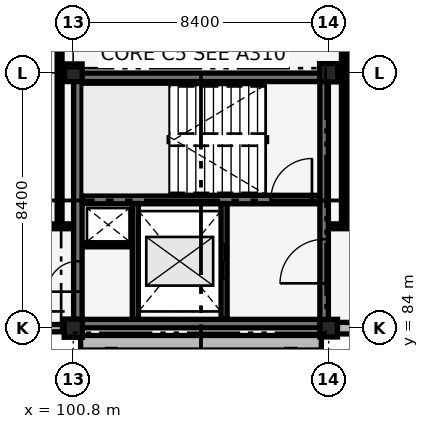
"""IFC4 building model, lengths in metres.
Left out: names, types, materials, properties, quantities, classifications, styles, units other than length and angle.
Written with IfcOpenShell. Run it as: python <this file> out.ifc"""

import sys

from ifc_helpers import new_model, si_unit, direction, frame, frame_2d, origin, origin_2d, place, context, subcontext, project, spatial, rectangle, extrude, element, fill, save


model = new_model("IFC4")
c1 = context("Model", 3, precision=1e-05, world=origin(), true_north=direction((0.0, 1.0)))
c2 = subcontext(c1, "Body", "Model", "MODEL_VIEW")
j1 = project(units=[si_unit("LENGTHUNIT", "METRE"), si_unit("PLANEANGLEUNIT", "RADIAN")], contexts=[c1])
p1 = place(None, origin())
s1 = spatial("IfcSite", under=j1, at=p1, CompositionType="ELEMENT")
p2 = place(p1, origin())
s2 = spatial("IfcBuilding", under=s1, at=p2, CompositionType="ELEMENT")
p3 = place(p2, frame((0.0, 0.0, 9.86)))
s3 = spatial("IfcBuildingStorey", under=s2, at=p3, CompositionType="ELEMENT", Elevation=9.86)
for number, where, z_axis, x_axis in (
    (1, (100.95, 84.15, 0.0), (0.0, 0.0, 1.0), (1.0, 0.0, 0.0)),
    (2, (100.95, 92.25, 0.0), (0.0, 0.0, 1.0), (1.0, 0.0, 0.0)),
):
    element("IfcWall", number, at=place(p3, frame(where, z_axis=z_axis, x_axis=x_axis)), inside=s3, PredefinedType="SHEAR", context=c2, shape_type="SweptSolid", body=[
        extrude(rectangle(XDim=8.1, YDim=0.28, at=frame_2d((4.05, 0.0))), origin(), (0.0, 0.0, 1.0), 3.78),
    ])
p4 = place(p3, frame((100.95, 84.15, 0.0), z_axis=(0.0, 0.0, 1.0), x_axis=(0.0, 1.0, 0.0)))
e3 = element("IfcWall", 3, at=p4, inside=s3, PredefinedType="SHEAR", context=c2, shape_type="SweptSolid", body=[
    extrude(rectangle(XDim=8.1, YDim=0.28, at=frame_2d((4.05, 0.0))), origin(), (0.0, 0.0, 1.0), 3.78),
])
p5 = place(p4, frame((1.05, 0.0, 0.0)))
e4 = element("IfcOpeningElement", 4, at=p5, cuts=e3, PredefinedType="OPENING", context=c2, shape_type="SweptSolid", body=[
    extrude(rectangle(XDim=1.0, YDim=2.15, at=frame_2d((0.5, 1.075))), frame((0.0, 0.15, 0.0), z_axis=(0.0, -1.0, 0.0), x_axis=(1.0, 0.0, 0.0)), (0.0, 0.0, 1.0), 0.3),
])
p6 = place(p3, frame((109.05, 84.15, 0.0), z_axis=(0.0, 0.0, 1.0), x_axis=(0.0, 1.0, 0.0)))
e5 = element("IfcWall", 5, at=p6, inside=s3, PredefinedType="SHEAR", context=c2, shape_type="SweptSolid", body=[
    extrude(rectangle(XDim=8.1, YDim=0.28, at=frame_2d((4.05, 0.0))), origin(), (0.0, 0.0, 1.0), 3.78),
])
p7 = place(p6, frame((1.325, 0.0, 0.0)))
e6 = element("IfcOpeningElement", 6, at=p7, cuts=e5, PredefinedType="OPENING", context=c2, shape_type="SweptSolid", body=[
    extrude(rectangle(XDim=1.45, YDim=2.15, at=frame_2d((0.725, 1.075))), frame((0.0, 0.15, 0.0), z_axis=(0.0, -1.0, 0.0), x_axis=(1.0, 0.0, 0.0)), (0.0, 0.0, 1.0), 0.3),
])
p8 = place(p3, frame((101.1, 88.23, 0.0), z_axis=(0.0, 0.0, 1.0), x_axis=(1.0, 0.0, 0.0)))
e7 = element("IfcWall", 7, at=p8, inside=s3, PredefinedType="SHEAR", context=c2, shape_type="SweptSolid", body=[
    extrude(rectangle(XDim=7.8, YDim=0.28, at=frame_2d((3.9, 0.0))), origin(), (0.0, 0.0, 1.0), 3.78),
])
p9 = place(p8, frame((6.2, 0.0, 0.0)))
e8 = element("IfcOpeningElement", 8, at=p9, cuts=e7, PredefinedType="OPENING", context=c2, shape_type="SweptSolid", body=[
    extrude(rectangle(XDim=1.35, YDim=2.15, at=frame_2d((0.675, 1.075))), frame((0.0, 0.15, 0.0), z_axis=(0.0, -1.0, 0.0), x_axis=(1.0, 0.0, 0.0)), (0.0, 0.0, 1.0), 0.3),
])
p10 = place(p3, frame((100.8, 84.0, 0.0), z_axis=(0.0, 0.0, 1.0), x_axis=(1.0, 0.0, 0.0)))
e9 = element("IfcColumn", 9, at=p10, inside=s3, PredefinedType="COLUMN", context=c2, shape_type="SweptSolid", body=[
    extrude(rectangle(XDim=0.6, YDim=0.6, at=origin_2d()), origin(), (0.0, 0.0, 1.0), 3.78),
])
for number, where, z_axis, x_axis in (
    (10, (100.8, 92.4, 0.0), (0.0, 0.0, 1.0), (1.0, 0.0, 0.0)),
    (11, (109.2, 84.0, 0.0), (0.0, 0.0, 1.0), (1.0, 0.0, 0.0)),
):
    element("IfcColumn", number, at=place(p3, frame(where, z_axis=z_axis, x_axis=x_axis)), inside=s3, PredefinedType="COLUMN", context=c2, shape_type="SweptSolid", body=[
        extrude(rectangle(XDim=0.58, YDim=0.58, at=origin_2d()), origin(), (0.0, 0.0, 1.0), 3.78),
    ])
p11 = place(p3, frame((109.2, 92.4, 0.0), z_axis=(0.0, 0.0, 1.0), x_axis=(1.0, 0.0, 0.0)))
e12 = element("IfcColumn", 12, at=p11, inside=s3, PredefinedType="COLUMN", context=c2, shape_type="SweptSolid", body=[
    extrude(rectangle(XDim=0.6, YDim=0.6, at=origin_2d()), origin(), (0.0, 0.0, 1.0), 3.78),
])
p12 = place(p3, frame((92.595, 84.0, 0.0), z_axis=(0.0, 0.0, 1.0), x_axis=(1.0, 0.0, 0.0)))
e13 = element("IfcWall", 13, at=p12, inside=s3, PredefinedType="SOLIDWALL", context=c2, shape_type="SweptSolid", body=[
    extrude(rectangle(XDim=7.92, YDim=0.24, at=frame_2d((3.96, 0.0))), origin(), (0.0, 0.0, 1.0), 3.78),
])
p13 = place(p12, frame((0.812, 0.0, 0.35)))
e14 = element("IfcOpeningElement", 14, at=p13, cuts=e13, PredefinedType="OPENING", context=c2, shape_type="SweptSolid", body=[
    extrude(rectangle(XDim=0.44, YDim=1.25, at=frame_2d((0.22, 0.625))), frame((0.0, 0.13, 0.0), z_axis=(0.0, -1.0, 0.0), x_axis=(1.0, 0.0, 0.0)), (0.0, 0.0, 1.0), 0.26),
])
p14 = place(p12, frame((2.276, 0.0, 0.35)))
e15 = element("IfcOpeningElement", 15, at=p14, cuts=e13, PredefinedType="OPENING", context=c2, shape_type="SweptSolid", body=[
    extrude(rectangle(XDim=0.44, YDim=1.25, at=frame_2d((0.22, 0.625))), frame((0.0, 0.13, 0.0), z_axis=(0.0, -1.0, 0.0), x_axis=(1.0, 0.0, 0.0)), (0.0, 0.0, 1.0), 0.26),
])
p15 = place(p12, frame((3.74, 0.0, 0.35)))
e16 = element("IfcOpeningElement", 16, at=p15, cuts=e13, PredefinedType="OPENING", context=c2, shape_type="SweptSolid", body=[
    extrude(rectangle(XDim=0.44, YDim=1.25, at=frame_2d((0.22, 0.625))), frame((0.0, 0.13, 0.0), z_axis=(0.0, -1.0, 0.0), x_axis=(1.0, 0.0, 0.0)), (0.0, 0.0, 1.0), 0.26),
])
p16 = place(p12, frame((5.204, 0.0, 0.35)))
e17 = element("IfcOpeningElement", 17, at=p16, cuts=e13, PredefinedType="OPENING", context=c2, shape_type="SweptSolid", body=[
    extrude(rectangle(XDim=0.44, YDim=1.25, at=frame_2d((0.22, 0.625))), frame((0.0, 0.13, 0.0), z_axis=(0.0, -1.0, 0.0), x_axis=(1.0, 0.0, 0.0)), (0.0, 0.0, 1.0), 0.26),
])
p17 = place(p12, frame((6.668, 0.0, 0.35)))
e18 = element("IfcOpeningElement", 18, at=p17, cuts=e13, PredefinedType="OPENING", context=c2, shape_type="SweptSolid", body=[
    extrude(rectangle(XDim=0.44, YDim=1.25, at=frame_2d((0.22, 0.625))), frame((0.0, 0.13, 0.0), z_axis=(0.0, -1.0, 0.0), x_axis=(1.0, 0.0, 0.0)), (0.0, 0.0, 1.0), 0.26),
])
p18 = place(p12, frame((0.812, 0.0, 1.8)))
e19 = element("IfcOpeningElement", 19, at=p18, cuts=e13, PredefinedType="OPENING", context=c2, shape_type="SweptSolid", body=[
    extrude(rectangle(XDim=0.44, YDim=1.25, at=frame_2d((0.22, 0.625))), frame((0.0, 0.13, 0.0), z_axis=(0.0, -1.0, 0.0), x_axis=(1.0, 0.0, 0.0)), (0.0, 0.0, 1.0), 0.26),
])
p19 = place(p12, frame((2.276, 0.0, 1.8)))
e20 = element("IfcOpeningElement", 20, at=p19, cuts=e13, PredefinedType="OPENING", context=c2, shape_type="SweptSolid", body=[
    extrude(rectangle(XDim=0.44, YDim=1.25, at=frame_2d((0.22, 0.625))), frame((0.0, 0.13, 0.0), z_axis=(0.0, -1.0, 0.0), x_axis=(1.0, 0.0, 0.0)), (0.0, 0.0, 1.0), 0.26),
])
p20 = place(p12, frame((3.74, 0.0, 1.8)))
e21 = element("IfcOpeningElement", 21, at=p20, cuts=e13, PredefinedType="OPENING", context=c2, shape_type="SweptSolid", body=[
    extrude(rectangle(XDim=0.44, YDim=1.25, at=frame_2d((0.22, 0.625))), frame((0.0, 0.13, 0.0), z_axis=(0.0, -1.0, 0.0), x_axis=(1.0, 0.0, 0.0)), (0.0, 0.0, 1.0), 0.26),
])
p21 = place(p12, frame((5.204, 0.0, 1.8)))
e22 = element("IfcOpeningElement", 22, at=p21, cuts=e13, PredefinedType="OPENING", context=c2, shape_type="SweptSolid", body=[
    extrude(rectangle(XDim=0.44, YDim=1.25, at=frame_2d((0.22, 0.625))), frame((0.0, 0.13, 0.0), z_axis=(0.0, -1.0, 0.0), x_axis=(1.0, 0.0, 0.0)), (0.0, 0.0, 1.0), 0.26),
])
p22 = place(p12, frame((6.668, 0.0, 1.8)))
e23 = element("IfcOpeningElement", 23, at=p22, cuts=e13, PredefinedType="OPENING", context=c2, shape_type="SweptSolid", body=[
    extrude(rectangle(XDim=0.44, YDim=1.25, at=frame_2d((0.22, 0.625))), frame((0.0, 0.13, 0.0), z_axis=(0.0, -1.0, 0.0), x_axis=(1.0, 0.0, 0.0)), (0.0, 0.0, 1.0), 0.26),
])
p23 = place(p3, frame((101.04, 83.52, 0.0), z_axis=(0.0, 0.0, 1.0), x_axis=(1.0, 0.0, 0.0)))
e24 = element("IfcWall", 24, at=p23, inside=s3, PredefinedType="SOLIDWALL", context=c2, shape_type="SweptSolid", body=[
    extrude(rectangle(XDim=7.92, YDim=0.48, at=frame_2d((3.96, 0.0))), origin(), (0.0, 0.0, 1.0), 4.08),
])
p24 = place(p3, frame((109.475, 84.0, 0.0), z_axis=(0.0, 0.0, 1.0), x_axis=(1.0, 0.0, 0.0)))
e25 = element("IfcWall", 25, at=p24, inside=s3, PredefinedType="SOLIDWALL", context=c2, shape_type="SweptSolid", body=[
    extrude(rectangle(XDim=7.84, YDim=0.38, at=frame_2d((3.92, 0.0))), origin(), (0.0, 0.0, 1.0), 3.01),
])
p25 = place(p24, frame((1.115, 0.0, 0.7)))
e26 = element("IfcOpeningElement", 26, at=p25, cuts=e25, PredefinedType="OPENING", context=c2, shape_type="SweptSolid", body=[
    extrude(rectangle(XDim=0.75, YDim=2.1, at=frame_2d((0.375, 1.05))), frame((0.0, 0.2, 0.0), z_axis=(0.0, -1.0, 0.0), x_axis=(1.0, 0.0, 0.0)), (0.0, 0.0, 1.0), 0.4),
])
p26 = place(p24, frame((2.683, 0.0, 0.7)))
e27 = element("IfcOpeningElement", 27, at=p26, cuts=e25, PredefinedType="OPENING", context=c2, shape_type="SweptSolid", body=[
    extrude(rectangle(XDim=0.75, YDim=2.1, at=frame_2d((0.375, 1.05))), frame((0.0, 0.2, 0.0), z_axis=(0.0, -1.0, 0.0), x_axis=(1.0, 0.0, 0.0)), (0.0, 0.0, 1.0), 0.4),
])
p27 = place(p24, frame((4.407, 0.0, 0.7)))
e28 = element("IfcOpeningElement", 28, at=p27, cuts=e25, PredefinedType="OPENING", context=c2, shape_type="SweptSolid", body=[
    extrude(rectangle(XDim=0.75, YDim=2.1, at=frame_2d((0.375, 1.05))), frame((0.0, 0.2, 0.0), z_axis=(0.0, -1.0, 0.0), x_axis=(1.0, 0.0, 0.0)), (0.0, 0.0, 1.0), 0.4),
])
p28 = place(p24, frame((5.975, 0.0, 0.7)))
e29 = element("IfcOpeningElement", 29, at=p28, cuts=e25, PredefinedType="OPENING", context=c2, shape_type="SweptSolid", body=[
    extrude(rectangle(XDim=0.75, YDim=2.1, at=frame_2d((0.375, 1.05))), frame((0.0, 0.2, 0.0), z_axis=(0.0, -1.0, 0.0), x_axis=(1.0, 0.0, 0.0)), (0.0, 0.0, 1.0), 0.4),
])
p29 = place(p3, frame((105.76, 84.3, 0.0), z_axis=(0.0, 0.0, 1.0), x_axis=(0.0, 1.0, 0.0)))
e30 = element("IfcWall", 30, at=p29, inside=s3, PredefinedType="SHEAR", context=c2, shape_type="SweptSolid", body=[
    extrude(rectangle(XDim=3.8, YDim=0.2, at=frame_2d((1.9, 0.0))), origin(), (0.0, 0.0, 1.0), 3.01),
])
p30 = place(p29, frame((1.35, 0.0, 0.0)))
e31 = element("IfcOpeningElement", 31, at=p30, cuts=e30, PredefinedType="OPENING", context=c2, shape_type="SweptSolid", body=[
    extrude(rectangle(XDim=1.1, YDim=2.15, at=frame_2d((0.55, 1.075))), frame((0.0, 0.11, 0.0), z_axis=(0.0, -1.0, 0.0), x_axis=(1.0, 0.0, 0.0)), (0.0, 0.0, 1.0), 0.22),
])
p31 = place(p3, frame((102.84, 84.3, 0.0), z_axis=(0.0, 0.0, 1.0), x_axis=(0.0, 1.0, 0.0)))
e32 = element("IfcWall", 32, at=p31, inside=s3, PredefinedType="SHEAR", context=c2, shape_type="SweptSolid", body=[
    extrude(rectangle(XDim=3.8, YDim=0.2, at=frame_2d((1.9, 0.0))), origin(), (0.0, 0.0, 1.0), 3.01),
])
p32 = place(p3, frame((101.12, 86.74, 0.0), z_axis=(0.0, 0.0, 1.0), x_axis=(1.0, 0.0, 0.0)))
e33 = element("IfcWall", 33, at=p32, inside=s3, PredefinedType="PARTITIONING", context=c2, shape_type="SweptSolid", body=[
    extrude(rectangle(XDim=1.62, YDim=0.13, at=frame_2d((0.81, 0.0))), origin(), (0.0, 0.0, 1.0), 3.0),
])
p33 = place(p3, frame((76.2, 87.35, 0.0), z_axis=(0.0, 0.0, 1.0), x_axis=(1.0, 0.0, 0.0)))
e34 = element("IfcWall", 34, at=p33, inside=s3, PredefinedType="PARTITIONING", context=c2, shape_type="SweptSolid", body=[
    extrude(rectangle(XDim=24.57, YDim=0.16, at=frame_2d((12.285, 0.0))), origin(), (0.0, 0.0, 1.0), 3.0),
])
p34 = place(p33, frame((11.635, 0.0, 0.0)))
e35 = element("IfcOpeningElement", 35, at=p34, cuts=e34, PredefinedType="OPENING", context=c2, shape_type="SweptSolid", body=[
    extrude(rectangle(XDim=1.3, YDim=2.2, at=frame_2d((0.65, 1.1))), frame((0.0, 0.09, 0.0), z_axis=(0.0, -1.0, 0.0), x_axis=(1.0, 0.0, 0.0)), (0.0, 0.0, 1.0), 0.18),
])
p35 = place(p3, frame((100.35, 87.5, 0.0), z_axis=(0.0, 0.0, 1.0), x_axis=(0.0, 1.0, 0.0)))
e36 = element("IfcWall", 36, at=p35, inside=s3, PredefinedType="PARTITIONING", context=c2, shape_type="SweptSolid", body=[
    extrude(rectangle(XDim=29.82, YDim=0.16, at=frame_2d((14.91, 0.0))), origin(), (0.0, 0.0, 1.0), 3.78),
])
p36 = place(p3, frame((109.23, 87.35, 0.0), z_axis=(0.0, 0.0, 1.0), x_axis=(1.0, 0.0, 0.0)))
e37 = element("IfcWall", 37, at=p36, inside=s3, PredefinedType="PARTITIONING", context=c2, shape_type="SweptSolid", body=[
    extrude(rectangle(XDim=16.74, YDim=0.16, at=frame_2d((8.37, 0.0))), origin(), (0.0, 0.0, 1.0), 2.95),
])
p37 = place(p36, frame((7.72, 0.0, 0.0)))
e38 = element("IfcOpeningElement", 38, at=p37, cuts=e37, PredefinedType="OPENING", context=c2, shape_type="SweptSolid", body=[
    extrude(rectangle(XDim=1.3, YDim=2.2, at=frame_2d((0.65, 1.1))), frame((0.0, 0.09, 0.0), z_axis=(0.0, -1.0, 0.0), x_axis=(1.0, 0.0, 0.0)), (0.0, 0.0, 1.0), 0.18),
])
p38 = place(p3, frame((109.7, 87.5, 0.0), z_axis=(0.0, 0.0, 1.0), x_axis=(0.0, 1.0, 0.0)))
e39 = element("IfcWall", 39, at=p38, inside=s3, PredefinedType="PARTITIONING", context=c2, shape_type="SweptSolid", body=[
    extrude(rectangle(XDim=29.92, YDim=0.16, at=frame_2d((14.96, 0.0))), origin(), (0.0, 0.0, 1.0), 2.91),
])
p39 = place(p9, origin())
e40 = element("IfcDoor", 40, at=p39, inside=s3, OperationType="SINGLE_SWING_RIGHT", PredefinedType="DOOR", context=c2, shape_type="SweptSolid", body=[
    extrude(rectangle(XDim=1.35, YDim=2.15, at=frame_2d((0.675, 1.075))), frame((0.0, 0.025, 0.0), z_axis=(0.0, -1.0, 0.0), x_axis=(1.0, 0.0, 0.0)), (0.0, 0.0, 1.0), 0.05),
])
fill(e8, e40)
p40 = place(p30, origin())
e41 = element("IfcDoor", 41, at=p40, inside=s3, OperationType="SLIDING_TO_LEFT", PredefinedType="DOOR", context=c2, shape_type="SweptSolid", body=[
    extrude(rectangle(XDim=1.1, YDim=2.15, at=frame_2d((0.55, 1.075))), frame((0.0, 0.025, 0.0), z_axis=(0.0, -1.0, 0.0), x_axis=(1.0, 0.0, 0.0)), (0.0, 0.0, 1.0), 0.05),
])
fill(e31, e41)
p41 = place(p7, origin())
e42 = element("IfcDoor", 42, at=p41, inside=s3, OperationType="DOUBLE_DOOR_SINGLE_SWING", PredefinedType="DOOR", context=c2, shape_type="SweptSolid", body=[
    extrude(rectangle(XDim=1.45, YDim=2.15, at=frame_2d((0.725, 1.075))), frame((0.0, 0.025, 0.0), z_axis=(0.0, -1.0, 0.0), x_axis=(1.0, 0.0, 0.0)), (0.0, 0.0, 1.0), 0.05),
])
fill(e6, e42)
p42 = place(p5, origin())
e43 = element("IfcDoor", 43, at=p42, inside=s3, OperationType="SINGLE_SWING_LEFT", PredefinedType="DOOR", context=c2, shape_type="SweptSolid", body=[
    extrude(rectangle(XDim=1.0, YDim=2.15, at=frame_2d((0.5, 1.075))), frame((0.0, 0.025, 0.0), z_axis=(0.0, -1.0, 0.0), x_axis=(1.0, 0.0, 0.0)), (0.0, 0.0, 1.0), 0.05),
])
fill(e4, e43)
save(model, sys.argv[1])
